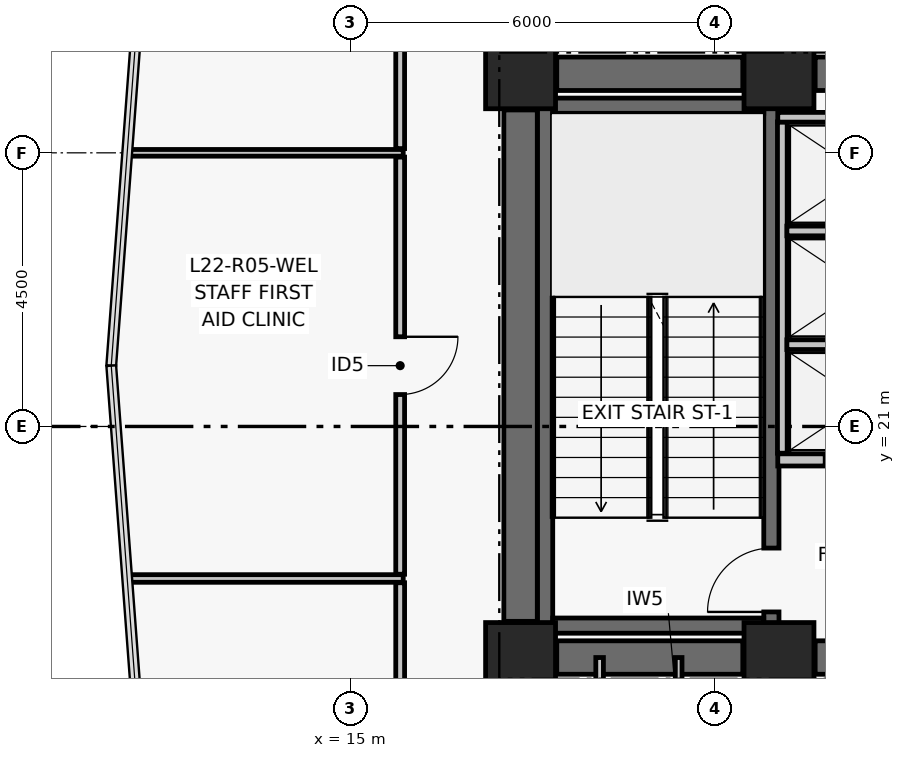
"""IFC4 building model, lengths in metres.
Left out: names, types, materials, properties, quantities, classifications, styles, units other than length and angle.
Written with IfcOpenShell. Run it as: python <this file> out.ifc"""

import sys

from ifc_helpers import new_model, si_unit, direction, frame, frame_2d, origin, origin_2d, place, context, subcontext, project, spatial, rectangle, extrude, element, fill, save


model = new_model("IFC4")
c1 = context("Model", 3, precision=1e-05, world=origin(), true_north=direction((0.0, 1.0)))
c2 = subcontext(c1, "Body", "Model", "MODEL_VIEW")
j1 = project(units=[si_unit("LENGTHUNIT", "METRE"), si_unit("PLANEANGLEUNIT", "RADIAN")], contexts=[c1])
p1 = place(None, origin())
s1 = spatial("IfcSite", under=j1, at=p1, CompositionType="ELEMENT")
p2 = place(p1, origin())
s2 = spatial("IfcBuilding", under=s1, at=p2, CompositionType="ELEMENT")
p3 = place(p2, frame((0.0, 0.0, 92.82)))
s3 = spatial("IfcBuildingStorey", under=s2, at=p3, CompositionType="ELEMENT", Elevation=92.82)
for number, where, z_axis, x_axis in (
    (1, (17.8, 17.2, 0.0), (0.0, 0.0, 1.0), (1.0, 0.0, 0.0)),
    (2, (22.05, 17.2, 0.0), (0.0, 0.0, 1.0), (1.0, 0.0, 0.0)),
    (3, (17.8, 26.8, 0.0), (0.0, 0.0, 1.0), (1.0, 0.0, 0.0)),
    (4, (22.05, 26.8, 0.0), (0.0, 0.0, 1.0), (1.0, 0.0, 0.0)),
):
    element("IfcColumn", number, at=place(p3, frame(where, z_axis=z_axis, x_axis=x_axis)), inside=s3, PredefinedType="COLUMN", context=c2, shape_type="SweptSolid", body=[
        extrude(rectangle(XDim=1.15, YDim=1.15, at=origin_2d()), origin(), (0.0, 0.0, 1.0), 3.72),
    ])
p4 = place(p3, frame((18.395, 17.2, 0.0), z_axis=(0.0, 0.0, 1.0), x_axis=(1.0, 0.0, 0.0)))
e5 = element("IfcWall", 5, at=p4, inside=s3, PredefinedType="SHEAR", context=c2, shape_type="SweptSolid", body=[
    extrude(rectangle(XDim=3.06, YDim=0.55, at=frame_2d((1.53, 0.0))), origin(), (0.0, 0.0, 1.0), 3.47),
])
p5 = place(p3, frame((22.645, 17.2, 0.0), z_axis=(0.0, 0.0, 1.0), x_axis=(1.0, 0.0, 0.0)))
e6 = element("IfcWall", 6, at=p5, inside=s3, PredefinedType="SHEAR", context=c2, shape_type="SweptSolid", body=[
    extrude(rectangle(XDim=1.705, YDim=0.55, at=frame_2d((0.853, 0.0))), origin(), (0.0, 0.0, 1.0), 3.47),
])
p6 = place(p3, frame((18.395, 26.8, 0.0), z_axis=(0.0, 0.0, 1.0), x_axis=(1.0, 0.0, 0.0)))
e7 = element("IfcWall", 7, at=p6, inside=s3, PredefinedType="SHEAR", context=c2, shape_type="SweptSolid", body=[
    extrude(rectangle(XDim=3.06, YDim=0.55, at=frame_2d((1.53, 0.0))), origin(), (0.0, 0.0, 1.0), 3.47),
])
p7 = place(p3, frame((22.645, 26.8, 0.0), z_axis=(0.0, 0.0, 1.0), x_axis=(1.0, 0.0, 0.0)))
e8 = element("IfcWall", 8, at=p7, inside=s3, PredefinedType="SHEAR", context=c2, shape_type="SweptSolid", body=[
    extrude(rectangle(XDim=1.705, YDim=0.55, at=frame_2d((0.853, 0.0))), origin(), (0.0, 0.0, 1.0), 3.47),
])
p8 = place(p3, frame((17.8, 17.795, 0.0), z_axis=(0.0, 0.0, 1.0), x_axis=(0.0, 1.0, 0.0)))
e9 = element("IfcWall", 9, at=p8, inside=s3, PredefinedType="SHEAR", context=c2, shape_type="SweptSolid", body=[
    extrude(rectangle(XDim=8.41, YDim=0.55, at=frame_2d((4.205, 0.0))), origin(), (0.0, 0.0, 1.0), 3.47),
])
p9 = place(p3, frame((18.204, 17.6, 0.0), z_axis=(0.0, 0.0, 1.0), x_axis=(0.0, 1.0, 0.0)))
e10 = element("IfcWall", 10, at=p9, inside=s3, PredefinedType="SHEAR", context=c2, shape_type="SweptSolid", body=[
    extrude(rectangle(XDim=8.8, YDim=0.25, at=frame_2d((4.4, 0.0))), origin(), (0.0, 0.0, 1.0), 3.47),
])
p10 = place(p3, frame((21.925, 17.6, 0.0), z_axis=(0.0, 0.0, 1.0), x_axis=(0.0, 1.0, 0.0)))
e11 = element("IfcWall", 11, at=p10, inside=s3, PredefinedType="SHEAR", context=c2, shape_type="SweptSolid", body=[
    extrude(rectangle(XDim=8.8, YDim=0.25, at=frame_2d((4.4, 0.0))), origin(), (0.0, 0.0, 1.0), 3.47),
])
p11 = place(p10, frame((0.35, 0.0, 0.0)))
e12 = element("IfcOpeningElement", 12, at=p11, cuts=e11, PredefinedType="OPENING", context=c2, shape_type="SweptSolid", body=[
    extrude(rectangle(XDim=1.05, YDim=2.08, at=frame_2d((0.525, 1.04))), frame((0.0, 0.135, 0.0), z_axis=(0.0, -1.0, 0.0), x_axis=(1.0, 0.0, 0.0)), (0.0, 0.0, 1.0), 0.27),
])
for number, where, z_axis, x_axis in (
    (13, (18.329, 17.725, 0.0), (0.0, 0.0, 1.0), (1.0, 0.0, 0.0)),
    (14, (18.329, 26.275, 0.0), (0.0, 0.0, 1.0), (1.0, 0.0, 0.0)),
):
    element("IfcWall", number, at=place(p3, frame(where, z_axis=z_axis, x_axis=x_axis)), inside=s3, PredefinedType="SHEAR", context=c2, shape_type="SweptSolid", body=[
        extrude(rectangle(XDim=3.471, YDim=0.25, at=frame_2d((1.735, 0.0))), origin(), (0.0, 0.0, 1.0), 3.47),
    ])
p12 = place(p3, frame((22.03, 20.45, 0.0), z_axis=(0.0, 0.0, 1.0), x_axis=(1.0, 0.0, 0.0)))
e15 = element("IfcWall", 15, at=p12, inside=s3, PredefinedType="PARTITIONING", context=c2, shape_type="SweptSolid", body=[
    extrude(rectangle(XDim=2.8, YDim=0.2, at=frame_2d((1.4, 0.0))), origin(), (0.0, 0.0, 1.0), 3.47),
])
p13 = place(p12, frame((0.78, 0.0, 0.0)))
e16 = element("IfcOpeningElement", 16, at=p13, cuts=e15, PredefinedType="OPENING", context=c2, shape_type="SweptSolid", body=[
    extrude(rectangle(XDim=1.1, YDim=2.08, at=frame_2d((0.55, 1.04))), frame((0.0, 0.11, 0.0), z_axis=(0.0, -1.0, 0.0), x_axis=(1.0, 0.0, 0.0)), (0.0, 0.0, 1.0), 0.22),
])
p14 = place(p3, frame((22.105, 20.56, 0.0), z_axis=(0.0, 0.0, 1.0), x_axis=(0.0, 1.0, 0.0)))
e17 = element("IfcWall", 17, at=p14, inside=s3, PredefinedType="PARTITIONING", context=c2, shape_type="SweptSolid", body=[
    extrude(rectangle(XDim=5.45, YDim=0.16, at=frame_2d((2.725, 0.0))), origin(), (0.0, 0.0, 1.0), 3.47),
])
p15 = place(p3, frame((22.18, 22.345, 0.0), z_axis=(0.0, 0.0, 1.0), x_axis=(1.0, 0.0, 0.0)))
e18 = element("IfcWall", 18, at=p15, inside=s3, PredefinedType="PARTITIONING", context=c2, shape_type="SweptSolid", body=[
    extrude(rectangle(XDim=2.65, YDim=0.16, at=frame_2d((1.325, 0.0))), origin(), (0.0, 0.0, 1.0), 3.47),
])
p16 = place(p3, frame((22.18, 24.215, 0.0), z_axis=(0.0, 0.0, 1.0), x_axis=(1.0, 0.0, 0.0)))
e19 = element("IfcWall", 19, at=p16, inside=s3, PredefinedType="PARTITIONING", context=c2, shape_type="SweptSolid", body=[
    extrude(rectangle(XDim=2.49, YDim=0.16, at=frame_2d((1.245, 0.0))), origin(), (0.0, 0.0, 1.0), 3.47),
])
p17 = place(p3, frame((22.03, 26.085, 0.0), z_axis=(0.0, 0.0, 1.0), x_axis=(1.0, 0.0, 0.0)))
e20 = element("IfcWall", 20, at=p17, inside=s3, PredefinedType="PARTITIONING", context=c2, shape_type="SweptSolid", body=[
    extrude(rectangle(XDim=2.83, YDim=0.16, at=frame_2d((1.415, 0.0))), origin(), (0.0, 0.0, 1.0), 3.47),
])
p18 = place(p3, frame((19.1, 14.95, 0.0), z_axis=(0.0, 0.0, 1.0), x_axis=(0.0, 1.0, 0.0)))
e21 = element("IfcWall", 21, at=p18, inside=s3, PredefinedType="PARTITIONING", context=c2, shape_type="SweptSolid", body=[
    extrude(rectangle(XDim=2.25, YDim=0.125, at=frame_2d((1.125, 0.0))), origin(), (0.0, 0.0, 1.0), 2.6),
])
p19 = place(p3, frame((20.4, 14.95, 0.0), z_axis=(0.0, 0.0, 1.0), x_axis=(0.0, 1.0, 0.0)))
e22 = element("IfcWall", 22, at=p19, inside=s3, PredefinedType="PARTITIONING", context=c2, shape_type="SweptSolid", body=[
    extrude(rectangle(XDim=2.25, YDim=0.11, at=frame_2d((1.125, 0.0))), origin(), (0.0, 0.0, 1.0), 2.6),
])
p20 = place(p3, frame((22.36, 14.95, 0.0), z_axis=(0.0, 0.0, 1.0), x_axis=(0.0, 1.0, 0.0)))
e23 = element("IfcWall", 23, at=p20, inside=s3, PredefinedType="PARTITIONING", context=c2, shape_type="SweptSolid", body=[
    extrude(rectangle(XDim=2.25, YDim=0.125, at=frame_2d((1.125, 0.0))), origin(), (0.0, 0.0, 1.0), 2.6),
])
p21 = place(p3, frame((15.82, 18.43, 0.0), z_axis=(0.0, 0.0, 1.0), x_axis=(0.0, -1.0, 0.0)))
e24 = element("IfcWall", 24, at=p21, inside=s3, PredefinedType="PARTITIONING", context=c2, shape_type="SweptSolid", body=[
    extrude(rectangle(XDim=5.14, YDim=0.145, at=frame_2d((2.57, 0.0))), origin(), (0.0, 0.0, 1.0), 2.65),
])
p22 = place(p3, frame((15.82, 28.7, 0.0), z_axis=(0.0, 0.0, 1.0), x_axis=(0.0, -1.0, 0.0)))
e25 = element("IfcWall", 25, at=p22, inside=s3, PredefinedType="PARTITIONING", context=c2, shape_type="SweptSolid", body=[
    extrude(rectangle(XDim=3.13, YDim=0.145, at=frame_2d((1.565, 0.0))), origin(), (0.0, 0.0, 1.0), 2.65),
])
p23 = place(p3, frame((15.82, 25.43, 0.0), z_axis=(0.0, 0.0, 1.0), x_axis=(0.0, -1.0, 0.0)))
e26 = element("IfcWall", 26, at=p23, inside=s3, PredefinedType="PARTITIONING", context=c2, shape_type="SweptSolid", body=[
    extrude(rectangle(XDim=6.86, YDim=0.145, at=frame_2d((3.43, 0.0))), origin(), (0.0, 0.0, 1.0), 3.05),
])
p24 = place(p23, frame((2.955, 0.0, 0.0)))
e27 = element("IfcOpeningElement", 27, at=p24, cuts=e26, PredefinedType="OPENING", context=c2, shape_type="SweptSolid", body=[
    extrude(rectangle(XDim=0.95, YDim=2.06, at=frame_2d((0.475, 1.03))), frame((0.0, 0.083, 0.0), z_axis=(0.0, -1.0, 0.0), x_axis=(1.0, 0.0, 0.0)), (0.0, 0.0, 1.0), 0.165),
])
p25 = place(p3, frame((11.321, 18.5, 0.0), z_axis=(0.0, 0.0, 1.0), x_axis=(1.0, 0.0, 0.0)))
e28 = element("IfcWall", 28, at=p25, inside=s3, PredefinedType="PARTITIONING", context=c2, shape_type="SweptSolid", body=[
    extrude(rectangle(XDim=4.549, YDim=0.125, at=frame_2d((2.275, 0.0))), origin(), (0.0, 0.0, 1.0), 2.85),
])
p26 = place(p3, frame((11.321, 25.5, 0.0), z_axis=(0.0, 0.0, 1.0), x_axis=(1.0, 0.0, 0.0)))
e29 = element("IfcWall", 29, at=p26, inside=s3, PredefinedType="PARTITIONING", context=c2, shape_type="SweptSolid", body=[
    extrude(rectangle(XDim=4.549, YDim=0.11, at=frame_2d((2.275, 0.0))), origin(), (0.0, 0.0, 1.0), 2.85),
])
p27 = place(p11, origin())
e30 = element("IfcDoor", 30, at=p27, inside=s3, OperationType="SINGLE_SWING_LEFT", PredefinedType="DOOR", context=c2, shape_type="SweptSolid", body=[
    extrude(rectangle(XDim=1.05, YDim=2.08, at=frame_2d((0.525, 1.04))), frame((0.0, 0.025, 0.0), z_axis=(0.0, -1.0, 0.0), x_axis=(1.0, 0.0, 0.0)), (0.0, 0.0, 1.0), 0.05),
])
fill(e12, e30)
p28 = place(p24, origin())
e31 = element("IfcDoor", 31, at=p28, inside=s3, OperationType="SINGLE_SWING_LEFT", PredefinedType="DOOR", context=c2, shape_type="SweptSolid", body=[
    extrude(rectangle(XDim=0.95, YDim=2.06, at=frame_2d((0.475, 1.03))), frame((0.0, 0.025, 0.0), z_axis=(0.0, -1.0, 0.0), x_axis=(1.0, 0.0, 0.0)), (0.0, 0.0, 1.0), 0.05),
])
fill(e27, e31)
save(model, sys.argv[1])
